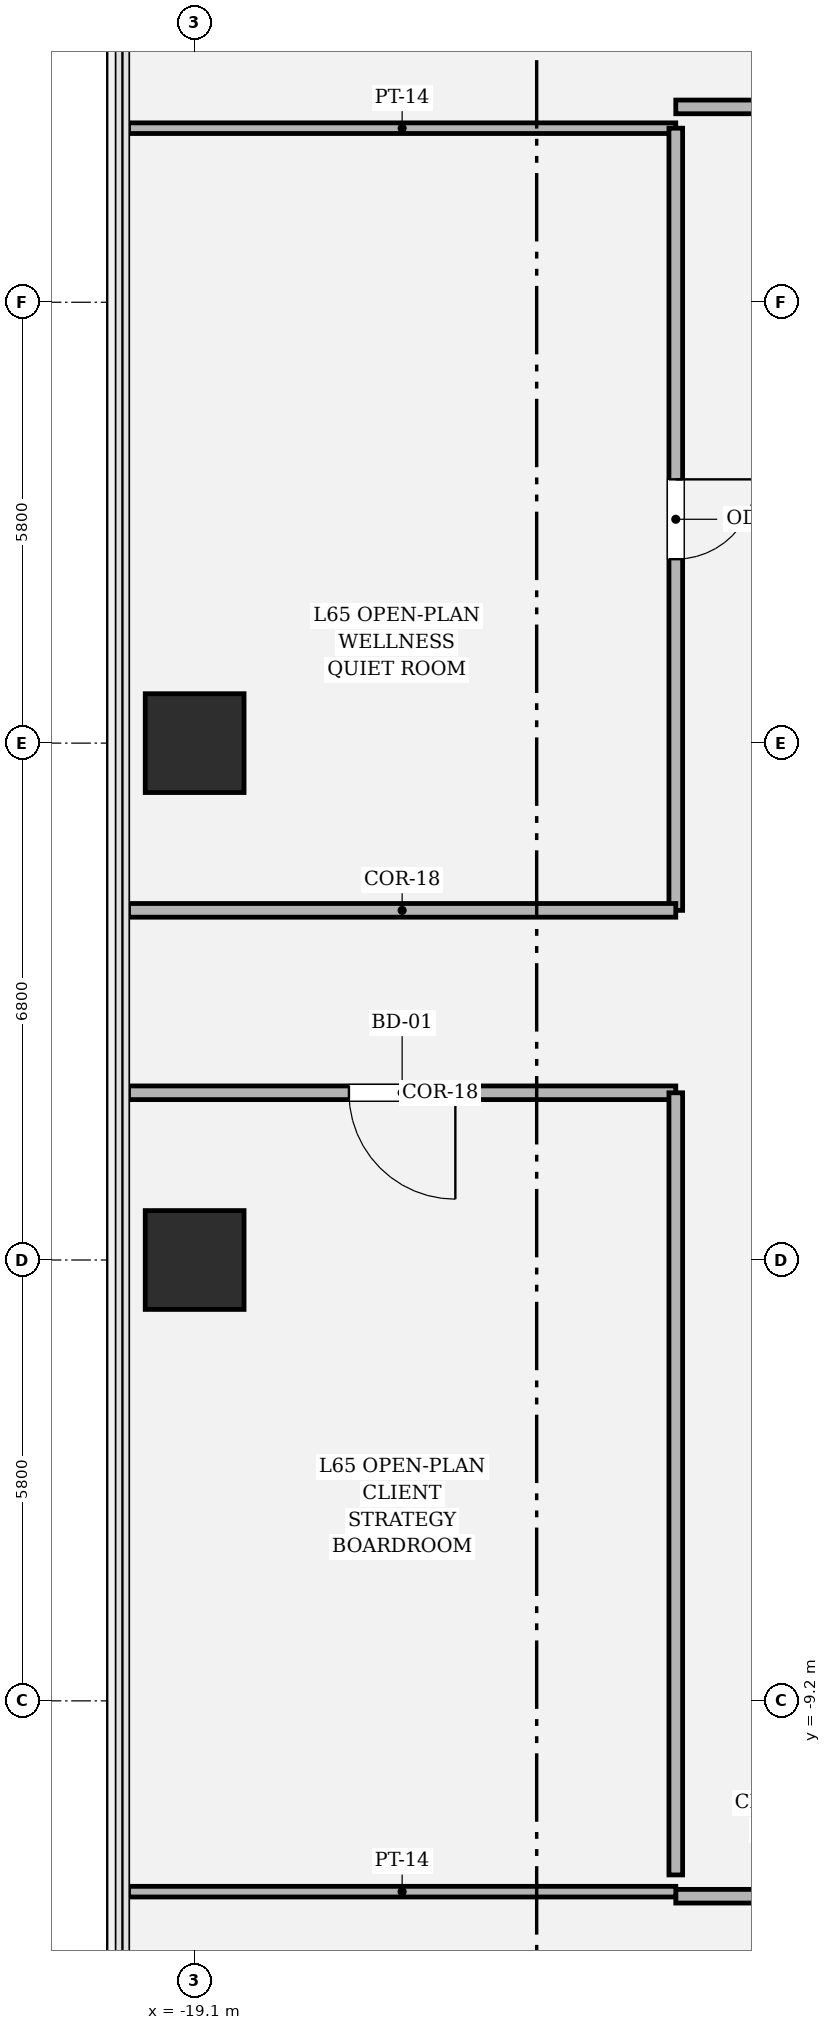
"""IFC4 building model, lengths in metres.
Left out: names, types, materials, properties, quantities, classifications, styles, units other than length and angle.
Written with IfcOpenShell. Run it as: python <this file> out.ifc"""

import sys

from ifc_helpers import new_model, si_unit, direction, frame, frame_2d, origin, origin_2d, place, context, subcontext, project, spatial, rectangle, hollow_rectangle, extrude, element, fill, save


model = new_model("IFC4")
c1 = context("Model", 3, precision=1e-05, world=origin(), true_north=direction((0.0, 1.0)))
c2 = subcontext(c1, "Body", "Model", "MODEL_VIEW")
j1 = project(units=[si_unit("LENGTHUNIT", "METRE"), si_unit("PLANEANGLEUNIT", "RADIAN")], contexts=[c1])
p1 = place(None, origin())
s1 = spatial("IfcSite", under=j1, at=p1, CompositionType="ELEMENT")
p2 = place(p1, origin())
s2 = spatial("IfcBuilding", under=s1, at=p2, CompositionType="ELEMENT")
p3 = place(p2, frame((0.0, 0.0, 275.7)))
s3 = spatial("IfcBuildingStorey", under=s2, at=p3, CompositionType="ELEMENT", Elevation=275.7)
for number, where, z_axis, x_axis in (
    (1, (-19.1, 3.4, 0.0), (0.0, 0.0, 1.0), (1.0, 0.0, 0.0)),
    (2, (-19.1, -3.4, 0.0), (0.0, 0.0, 1.0), (1.0, 0.0, 0.0)),
):
    element("IfcColumn", number, at=place(p3, frame(where, z_axis=z_axis, x_axis=x_axis)), inside=s3, PredefinedType="COLUMN", context=c2, shape_type="SweptSolid", body=[
        extrude(hollow_rectangle(XDim=1.3, YDim=1.3, WallThickness=0.038, at=origin_2d()), origin(), (0.0, 0.0, 1.0), 4.05),
    ])
p4 = place(p3, frame((-12.77, -11.77, 0.0), z_axis=(0.0, 0.0, 1.0), x_axis=(1.0, 0.0, 0.0)))
e3 = element("IfcWall", 3, at=p4, inside=s3, PredefinedType="PARTITIONING", context=c2, shape_type="SweptSolid", body=[
    extrude(rectangle(XDim=15.11, YDim=0.18, at=frame_2d((7.555, 0.0))), origin(), (0.0, 0.0, 1.0), 3.244),
])
p5 = place(p4, frame((7.03, 0.0, 0.0)))
e4 = element("IfcOpeningElement", 4, at=p5, cuts=e3, PredefinedType="OPENING", context=c2, shape_type="SweptSolid", body=[
    extrude(rectangle(XDim=1.05, YDim=2.2, at=frame_2d((0.525, 1.1))), frame((0.0, 0.1, 0.0), z_axis=(0.0, -1.0, 0.0), x_axis=(1.0, 0.0, 0.0)), (0.0, 0.0, 1.0), 0.2),
])
p6 = place(p3, frame((-19.97, -11.71, 0.0), z_axis=(0.0, 0.0, 1.0), x_axis=(1.0, 0.0, 0.0)))
e5 = element("IfcWall", 5, at=p6, inside=s3, PredefinedType="PARTITIONING", context=c2, shape_type="SweptSolid", body=[
    extrude(rectangle(XDim=7.2, YDim=0.14, at=frame_2d((3.6, 0.0))), origin(), (0.0, 0.0, 1.0), 3.244),
])
p7 = place(p3, frame((-19.97, -1.2, 0.0), z_axis=(0.0, 0.0, 1.0), x_axis=(1.0, 0.0, 0.0)))
e6 = element("IfcWall", 6, at=p7, inside=s3, PredefinedType="PARTITIONING", context=c2, shape_type="SweptSolid", body=[
    extrude(rectangle(XDim=7.2, YDim=0.18, at=frame_2d((3.6, 0.0))), origin(), (0.0, 0.0, 1.0), 3.244),
])
p8 = place(p7, frame((2.9, 0.0, 0.0)))
e7 = element("IfcOpeningElement", 7, at=p8, cuts=e6, PredefinedType="OPENING", context=c2, shape_type="SweptSolid", body=[
    extrude(rectangle(XDim=1.4, YDim=2.25, at=frame_2d((0.7, 1.125))), frame((0.0, 0.1, 0.0), z_axis=(0.0, -1.0, 0.0), x_axis=(1.0, 0.0, 0.0)), (0.0, 0.0, 1.0), 0.2),
])
p9 = place(p3, frame((-12.77, -1.2, 0.0), z_axis=(0.0, 0.0, 1.0), x_axis=(0.0, -1.0, 0.0)))
e8 = element("IfcWall", 8, at=p9, inside=s3, PredefinedType="PARTITIONING", context=c2, shape_type="SweptSolid", body=[
    extrude(rectangle(XDim=10.29, YDim=0.18, at=frame_2d((5.145, 0.0))), origin(), (0.0, 0.0, 1.0), 3.244),
])
p10 = place(p3, frame((-19.97, 11.49, 0.0), z_axis=(0.0, 0.0, 1.0), x_axis=(1.0, 0.0, 0.0)))
e9 = element("IfcWall", 9, at=p10, inside=s3, PredefinedType="PARTITIONING", context=c2, shape_type="SweptSolid", body=[
    extrude(rectangle(XDim=7.2, YDim=0.14, at=frame_2d((3.6, 0.0))), origin(), (0.0, 0.0, 1.0), 3.244),
])
p11 = place(p3, frame((-12.77, 11.49, 0.0), z_axis=(0.0, 0.0, 1.0), x_axis=(0.0, -1.0, 0.0)))
e10 = element("IfcWall", 10, at=p11, inside=s3, PredefinedType="PARTITIONING", context=c2, shape_type="SweptSolid", body=[
    extrude(rectangle(XDim=10.29, YDim=0.18, at=frame_2d((5.145, 0.0))), origin(), (0.0, 0.0, 1.0), 3.244),
])
p12 = place(p11, frame((4.62, 0.0, 0.0)))
e11 = element("IfcOpeningElement", 11, at=p12, cuts=e10, PredefinedType="OPENING", context=c2, shape_type="SweptSolid", body=[
    extrude(rectangle(XDim=1.05, YDim=2.2, at=frame_2d((0.525, 1.1))), frame((0.0, 0.1, 0.0), z_axis=(0.0, -1.0, 0.0), x_axis=(1.0, 0.0, 0.0)), (0.0, 0.0, 1.0), 0.2),
])
p13 = place(p3, frame((-12.77, 1.2, 0.0), z_axis=(0.0, 0.0, 1.0), x_axis=(-1.0, 0.0, 0.0)))
e12 = element("IfcWall", 12, at=p13, inside=s3, PredefinedType="PARTITIONING", context=c2, shape_type="SweptSolid", body=[
    extrude(rectangle(XDim=7.2, YDim=0.18, at=frame_2d((3.6, 0.0))), origin(), (0.0, 0.0, 1.0), 3.244),
])
p14 = place(p3, frame((2.34, 11.77, 0.0), z_axis=(0.0, 0.0, 1.0), x_axis=(-1.0, 0.0, 0.0)))
e13 = element("IfcWall", 13, at=p14, inside=s3, PredefinedType="PARTITIONING", context=c2, shape_type="SweptSolid", body=[
    extrude(rectangle(XDim=15.11, YDim=0.18, at=frame_2d((7.555, 0.0))), origin(), (0.0, 0.0, 1.0), 3.244),
])
p15 = place(p14, frame((7.03, 0.0, 0.0)))
e14 = element("IfcOpeningElement", 14, at=p15, cuts=e13, PredefinedType="OPENING", context=c2, shape_type="SweptSolid", body=[
    extrude(rectangle(XDim=1.05, YDim=2.2, at=frame_2d((0.525, 1.1))), frame((0.0, 0.1, 0.0), z_axis=(0.0, -1.0, 0.0), x_axis=(1.0, 0.0, 0.0)), (0.0, 0.0, 1.0), 0.2),
])
p16 = place(p8, origin())
e15 = element("IfcDoor", 15, at=p16, inside=s3, OperationType="SINGLE_SWING_RIGHT", PredefinedType="DOOR", context=c2, shape_type="SweptSolid", body=[
    extrude(rectangle(XDim=1.4, YDim=2.25, at=frame_2d((0.7, 1.125))), frame((0.0, 0.025, 0.0), z_axis=(0.0, -1.0, 0.0), x_axis=(1.0, 0.0, 0.0)), (0.0, 0.0, 1.0), 0.05),
])
fill(e7, e15)
p17 = place(p12, origin())
e16 = element("IfcDoor", 16, at=p17, inside=s3, OperationType="SINGLE_SWING_LEFT", PredefinedType="DOOR", context=c2, shape_type="SweptSolid", body=[
    extrude(rectangle(XDim=1.05, YDim=2.2, at=frame_2d((0.525, 1.1))), frame((0.0, 0.025, 0.0), z_axis=(0.0, -1.0, 0.0), x_axis=(1.0, 0.0, 0.0)), (0.0, 0.0, 1.0), 0.05),
])
fill(e11, e16)
save(model, sys.argv[1])
